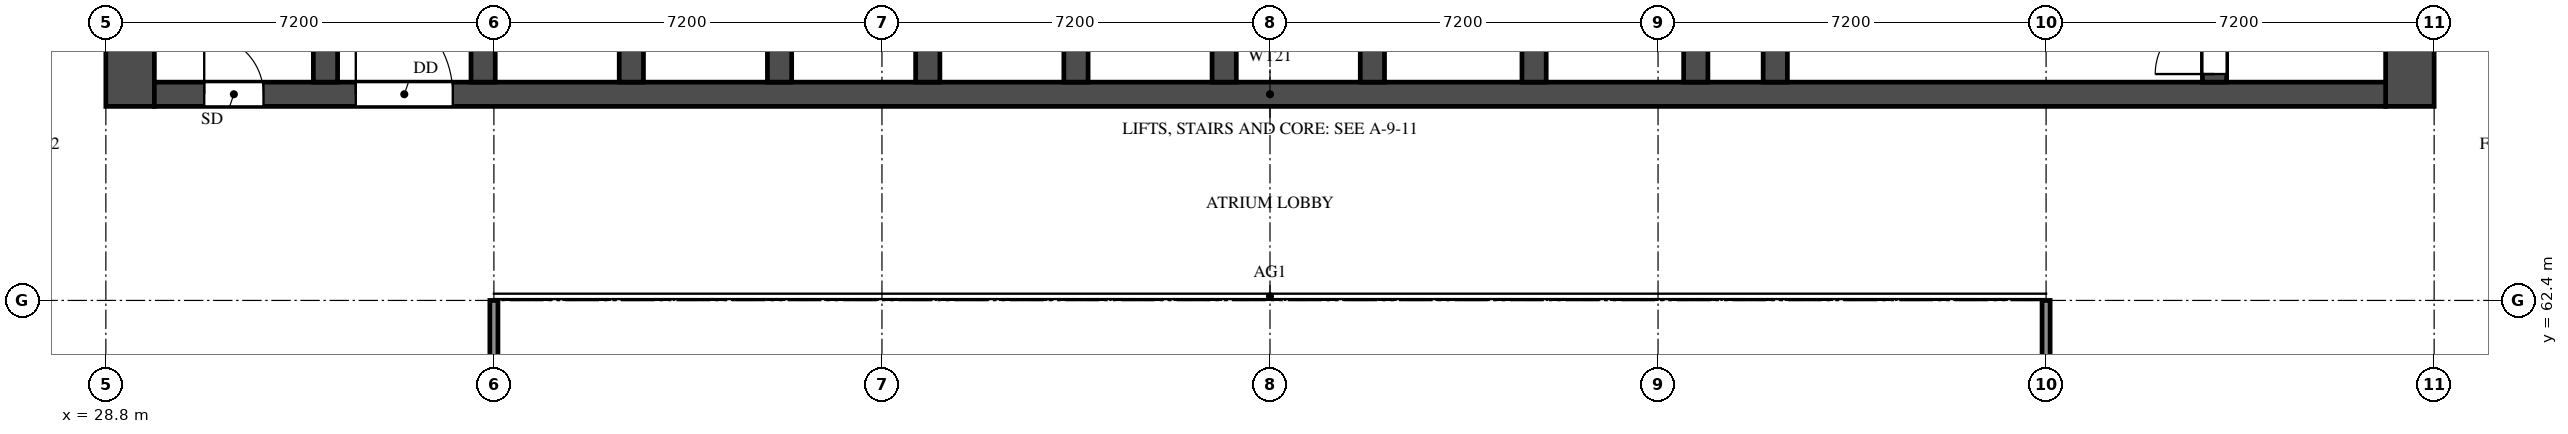
"""IFC4 building model, lengths in metres.
Left out: names, types, materials, properties, quantities, classifications, styles, units other than length and angle.
Written with IfcOpenShell. Run it as: python <this file> out.ifc"""

import sys

from ifc_helpers import new_model, si_unit, direction, frame, frame_2d, origin, place, context, subcontext, project, spatial, rectangle, extrude, element, fill, save


model = new_model("IFC4")
c1 = context("Model", 3, precision=1e-05, world=origin(), true_north=direction((0.0, 1.0)))
c2 = subcontext(c1, "Body", "Model", "MODEL_VIEW")
j1 = project(units=[si_unit("LENGTHUNIT", "METRE"), si_unit("PLANEANGLEUNIT", "RADIAN")], contexts=[c1])
p1 = place(None, origin())
s1 = spatial("IfcSite", under=j1, at=p1, CompositionType="ELEMENT")
p2 = place(p1, origin())
s2 = spatial("IfcBuilding", under=s1, at=p2, CompositionType="ELEMENT")
p3 = place(p2, frame((0.0, 0.0, 62.0)))
s3 = spatial("IfcBuildingStorey", under=s2, at=p3, CompositionType="ELEMENT", Elevation=62.0)
for number, where, z_axis, x_axis in (
    (1, (29.25, 66.0, 0.0), (0.0, 0.0, 1.0), (0.0, 1.0, 0.0)),
    (2, (71.55, 66.0, 0.0), (0.0, 0.0, 1.0), (0.0, 1.0, 0.0)),
):
    element("IfcWall", number, at=place(p3, frame(where, z_axis=z_axis, x_axis=x_axis)), inside=s3, PredefinedType="SHEAR", context=c2, shape_type="SweptSolid", body=[
        extrude(rectangle(XDim=12.0, YDim=0.9, at=frame_2d((6.0, 0.0))), origin(), (0.0, 0.0, 1.0), 3.18),
    ])
p4 = place(p3, frame((29.7, 66.225, 0.0), z_axis=(0.0, 0.0, 1.0), x_axis=(1.0, 0.0, 0.0)))
e3 = element("IfcWall", 3, at=p4, inside=s3, PredefinedType="SHEAR", context=c2, shape_type="SweptSolid", body=[
    extrude(rectangle(XDim=41.4, YDim=0.45, at=frame_2d((20.7, 0.0))), origin(), (0.0, 0.0, 1.0), 3.18),
])
p5 = place(p4, frame((0.925, 0.0, 0.0)))
e4 = element("IfcOpeningElement", 4, at=p5, cuts=e3, PredefinedType="OPENING", context=c2, shape_type="SweptSolid", body=[
    extrude(rectangle(XDim=1.1, YDim=2.1, at=frame_2d((0.55, 1.05))), frame((0.0, 0.235, 0.0), z_axis=(0.0, -1.0, 0.0), x_axis=(1.0, 0.0, 0.0)), (0.0, 0.0, 1.0), 0.47),
])
p6 = place(p4, frame((3.738, 0.0, 0.0)))
e5 = element("IfcOpeningElement", 5, at=p6, cuts=e3, PredefinedType="OPENING", context=c2, shape_type="SweptSolid", body=[
    extrude(rectangle(XDim=1.8, YDim=2.1, at=frame_2d((0.9, 1.05))), frame((0.0, 0.235, 0.0), z_axis=(0.0, -1.0, 0.0), x_axis=(1.0, 0.0, 0.0)), (0.0, 0.0, 1.0), 0.47),
])
p7 = place(p3, frame((32.875, 66.45, 0.0), z_axis=(0.0, 0.0, 1.0), x_axis=(0.0, 1.0, 0.0)))
e6 = element("IfcWall", 6, at=p7, inside=s3, PredefinedType="SHEAR", context=c2, shape_type="SweptSolid", body=[
    extrude(rectangle(XDim=10.65, YDim=0.45, at=frame_2d((5.325, 0.0))), origin(), (0.0, 0.0, 1.0), 3.18),
])
p8 = place(p3, frame((67.925, 66.45, 0.0), z_axis=(0.0, 0.0, 1.0), x_axis=(0.0, 1.0, 0.0)))
e7 = element("IfcWall", 7, at=p8, inside=s3, PredefinedType="SHEAR", context=c2, shape_type="SweptSolid", body=[
    extrude(rectangle(XDim=10.65, YDim=0.45, at=frame_2d((5.325, 0.0))), origin(), (0.0, 0.0, 1.0), 3.18),
])
p9 = place(p8, frame((0.15, 0.0, 0.0)))
e8 = element("IfcOpeningElement", 8, at=p9, cuts=e7, PredefinedType="OPENING", context=c2, shape_type="SweptSolid", body=[
    extrude(rectangle(XDim=1.1, YDim=2.1, at=frame_2d((0.55, 1.05))), frame((0.0, 0.235, 0.0), z_axis=(0.0, -1.0, 0.0), x_axis=(1.0, 0.0, 0.0)), (0.0, 0.0, 1.0), 0.47),
])
p10 = place(p3, frame((59.775, 66.45, 0.0), z_axis=(0.0, 0.0, 1.0), x_axis=(0.0, 1.0, 0.0)))
e9 = element("IfcWall", 9, at=p10, inside=s3, PredefinedType="SHEAR", context=c2, shape_type="SweptSolid", body=[
    extrude(rectangle(XDim=6.025, YDim=0.45, at=frame_2d((3.013, 0.0))), origin(), (0.0, 0.0, 1.0), 3.18),
])
p11 = place(p10, frame((3.85, 0.0, 0.0)))
e10 = element("IfcOpeningElement", 10, at=p11, cuts=e9, PredefinedType="OPENING", context=c2, shape_type="SweptSolid", body=[
    extrude(rectangle(XDim=1.2, YDim=2.1, at=frame_2d((0.6, 1.05))), frame((0.0, 0.235, 0.0), z_axis=(0.0, -1.0, 0.0), x_axis=(1.0, 0.0, 0.0)), (0.0, 0.0, 1.0), 0.47),
])
for number, where, z_axis, x_axis in (
    (11, (35.8, 66.45, 0.0), (0.0, 0.0, 1.0), (0.0, 1.0, 0.0)),
    (12, (38.55, 66.45, 0.0), (0.0, 0.0, 1.0), (0.0, 1.0, 0.0)),
    (13, (41.3, 66.45, 0.0), (0.0, 0.0, 1.0), (0.0, 1.0, 0.0)),
    (14, (44.05, 66.45, 0.0), (0.0, 0.0, 1.0), (0.0, 1.0, 0.0)),
    (15, (46.8, 66.45, 0.0), (0.0, 0.0, 1.0), (0.0, 1.0, 0.0)),
    (16, (49.55, 66.45, 0.0), (0.0, 0.0, 1.0), (0.0, 1.0, 0.0)),
    (17, (52.3, 66.45, 0.0), (0.0, 0.0, 1.0), (0.0, 1.0, 0.0)),
    (18, (55.3, 66.45, 0.0), (0.0, 0.0, 1.0), (0.0, 1.0, 0.0)),
    (19, (58.3, 66.45, 0.0), (0.0, 0.0, 1.0), (0.0, 1.0, 0.0)),
):
    element("IfcWall", number, at=place(p3, frame(where, z_axis=z_axis, x_axis=x_axis)), inside=s3, PredefinedType="SHEAR", context=c2, shape_type="SweptSolid", body=[
        extrude(rectangle(XDim=2.425, YDim=0.45, at=frame_2d((1.212, 0.0))), origin(), (0.0, 0.0, 1.0), 3.18),
    ])
for number, where, z_axis, x_axis in (
    (20, (36.0, 48.0, 0.0), (0.0, 0.0, 1.0), (0.0, 1.0, 0.0)),
    (21, (64.8, 48.0, 0.0), (0.0, 0.0, 1.0), (0.0, 1.0, 0.0)),
):
    element("IfcWall", number, at=place(p3, frame(where, z_axis=z_axis, x_axis=x_axis)), inside=s3, PredefinedType="SOLIDWALL", context=c2, shape_type="SweptSolid", body=[
        extrude(rectangle(XDim=14.4, YDim=0.15, at=frame_2d((7.2, 0.0))), origin(), (0.0, 0.0, 1.0), 2.28),
    ])
p12 = place(p5, origin())
e22 = element("IfcDoor", 22, at=p12, inside=s3, OperationType="SINGLE_SWING_LEFT", PredefinedType="DOOR", context=c2, shape_type="SweptSolid", body=[
    extrude(rectangle(XDim=1.1, YDim=2.1, at=frame_2d((0.55, 1.05))), frame((0.0, 0.025, 0.0), z_axis=(0.0, -1.0, 0.0), x_axis=(1.0, 0.0, 0.0)), (0.0, 0.0, 1.0), 0.05),
])
fill(e4, e22)
p13 = place(p9, origin())
e23 = element("IfcDoor", 23, at=p13, inside=s3, OperationType="SINGLE_SWING_LEFT", PredefinedType="DOOR", context=c2, shape_type="SweptSolid", body=[
    extrude(rectangle(XDim=1.1, YDim=2.1, at=frame_2d((0.55, 1.05))), frame((0.0, 0.025, 0.0), z_axis=(0.0, -1.0, 0.0), x_axis=(1.0, 0.0, 0.0)), (0.0, 0.0, 1.0), 0.05),
])
fill(e8, e23)
p14 = place(p6, origin())
e24 = element("IfcDoor", 24, at=p14, inside=s3, OperationType="DOUBLE_DOOR_SINGLE_SWING", PredefinedType="DOOR", context=c2, shape_type="SweptSolid", body=[
    extrude(rectangle(XDim=1.8, YDim=2.1, at=frame_2d((0.9, 1.05))), frame((0.0, 0.025, 0.0), z_axis=(0.0, -1.0, 0.0), x_axis=(1.0, 0.0, 0.0)), (0.0, 0.0, 1.0), 0.05),
])
fill(e5, e24)
save(model, sys.argv[1])
